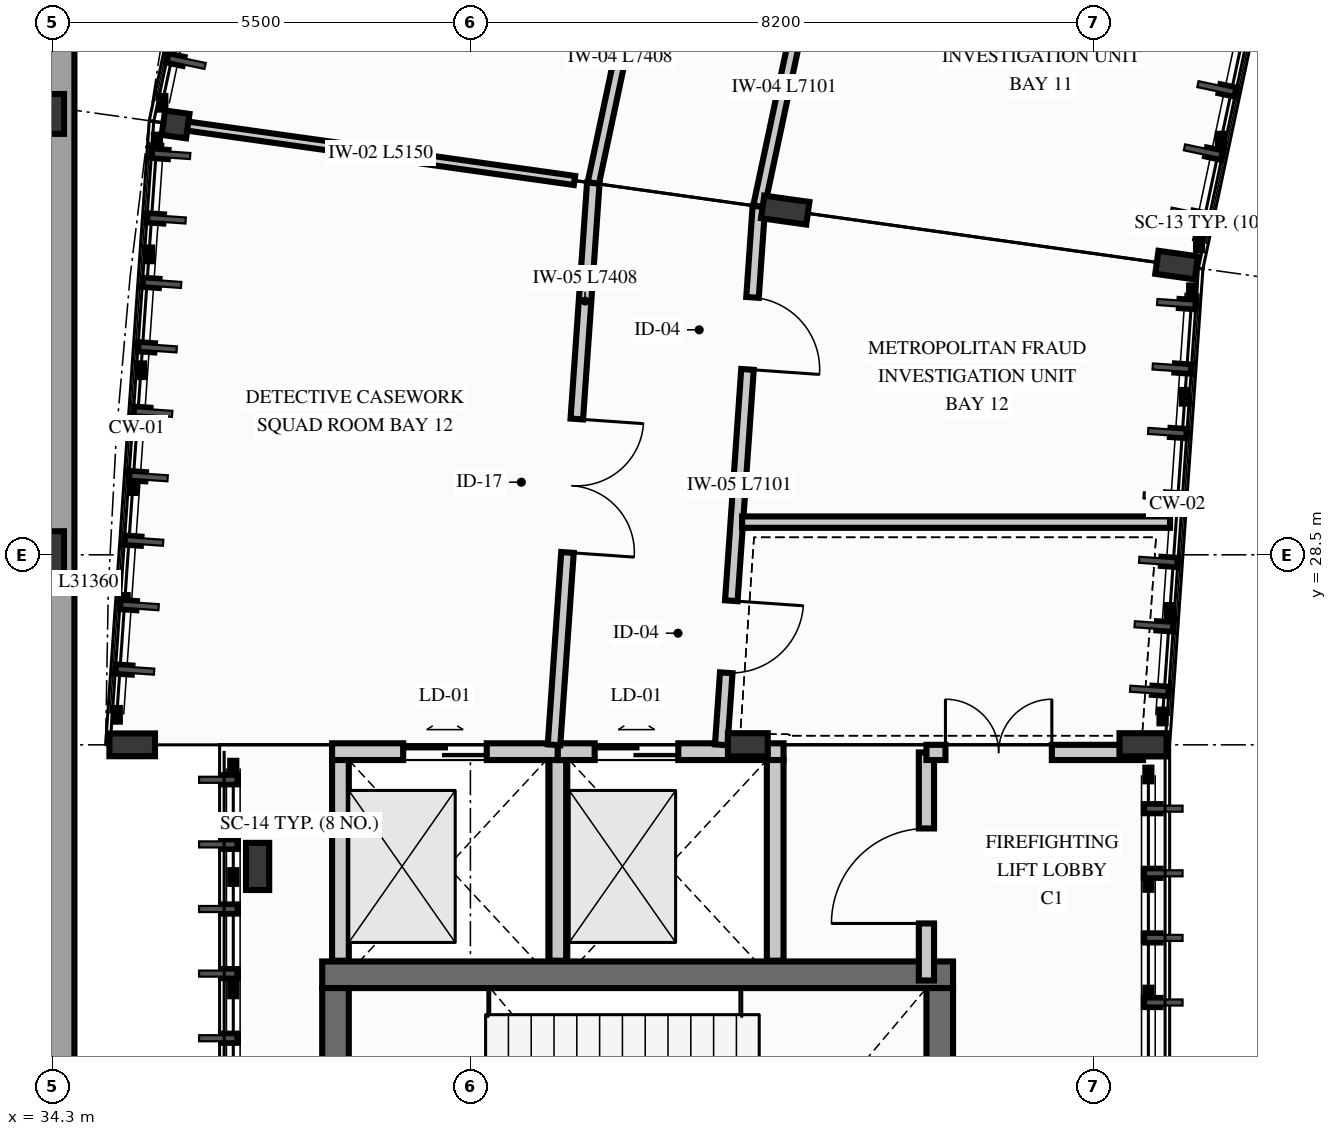
"""IFC4 building model, lengths in metres.
Left out: names, types, materials, properties, quantities, classifications, styles, units other than length and angle.
Written with IfcOpenShell. Run it as: python <this file> out.ifc"""

import sys

from ifc_helpers import new_model, si_unit, direction, frame, frame_2d, origin, origin_2d, place, context, subcontext, project, spatial, rectangle, hollow_circle, i_section, extrude, element, fill, save


model = new_model("IFC4")
c1 = context("Model", 3, precision=1e-05, world=origin(), true_north=direction((0.0, 1.0)))
c2 = subcontext(c1, "Body", "Model", "MODEL_VIEW")
j1 = project(units=[si_unit("LENGTHUNIT", "METRE"), si_unit("PLANEANGLEUNIT", "RADIAN")], contexts=[c1])
p1 = place(None, origin())
s1 = spatial("IfcSite", under=j1, at=p1, CompositionType="ELEMENT")
p2 = place(p1, origin())
s2 = spatial("IfcBuilding", under=s1, at=p2, CompositionType="ELEMENT")
p3 = place(p2, frame((0.0, 0.0, 5.1)))
s3 = spatial("IfcBuildingStorey", under=s2, at=p3, CompositionType="ELEMENT", Elevation=5.1)
p4 = place(p3, frame((37.85, 22.975, 0.0), z_axis=(0.0, 0.0, 1.0), x_axis=(1.0, 0.0, 0.0)))
e1 = element("IfcWall", 1, at=p4, inside=s3, PredefinedType="SHEAR", context=c2, shape_type="SweptSolid", body=[
    extrude(rectangle(XDim=8.3, YDim=0.35, at=frame_2d((4.15, 0.0))), origin(), (0.0, 0.0, 1.0), 3.98),
])
p5 = place(p3, frame((38.025, 16.0, 0.0), z_axis=(0.0, 0.0, 1.0), x_axis=(0.0, 1.0, 0.0)))
e2 = element("IfcWall", 2, at=p5, inside=s3, PredefinedType="SHEAR", context=c2, shape_type="SweptSolid", body=[
    extrude(rectangle(XDim=6.8, YDim=0.35, at=frame_2d((3.4, 0.0))), origin(), (0.0, 0.0, 1.0), 3.98),
])
p6 = place(p5, frame((2.6, 0.0, 0.0)))
e3 = element("IfcOpeningElement", 3, at=p6, cuts=e2, PredefinedType="OPENING", context=c2, shape_type="SweptSolid", body=[
    extrude(rectangle(XDim=1.25, YDim=2.2, at=frame_2d((0.625, 1.1))), frame((0.0, 0.185, 0.0), z_axis=(0.0, -1.0, 0.0), x_axis=(1.0, 0.0, 0.0)), (0.0, 0.0, 1.0), 0.37),
])
p7 = place(p3, frame((45.975, 16.0, 0.0), z_axis=(0.0, 0.0, 1.0), x_axis=(0.0, 1.0, 0.0)))
e4 = element("IfcWall", 4, at=p7, inside=s3, PredefinedType="SHEAR", context=c2, shape_type="SweptSolid", body=[
    extrude(rectangle(XDim=6.8, YDim=0.35, at=frame_2d((3.4, 0.0))), origin(), (0.0, 0.0, 1.0), 3.98),
])
p8 = place(p3, frame((49.091, 32.312, 0.0), z_axis=(0.0, 0.0, 1.0), x_axis=(0.13917310096, 0.990268068742, 0.0)))
e5 = element("IfcColumn", 5, at=p8, inside=s3, PredefinedType="COLUMN", context=c2, shape_type="SweptSolid", body=[
    extrude(i_section(OverallWidth=0.306, OverallDepth=0.524, WebThickness=0.021, FlangeThickness=0.04, FilletRadius=0.027, at=origin_2d()), origin(), (0.0, 0.0, 1.0), 4.2),
])
p9 = place(p3, frame((43.942, 33.035, 0.0), z_axis=(0.0, 0.0, 1.0), x_axis=(0.13917310096, 0.990268068742, 0.0)))
e6 = element("IfcColumn", 6, at=p9, inside=s3, PredefinedType="COLUMN", context=c2, shape_type="SweptSolid", body=[
    extrude(i_section(OverallWidth=0.3, OverallDepth=0.6, WebThickness=0.015, FlangeThickness=0.03, FilletRadius=0.027, at=origin_2d()), origin(), (0.0, 0.0, 1.0), 4.2),
])
p10 = place(p3, frame((35.921, 34.163, 0.0), z_axis=(0.0, 0.0, 1.0), x_axis=(0.13917310096, 0.990268068742, 0.0)))
e7 = element("IfcColumn", 7, at=p10, inside=s3, PredefinedType="COLUMN", context=c2, shape_type="SweptSolid", body=[
    extrude(hollow_circle(Radius=0.162, WallThickness=0.016, at=origin_2d()), origin(), (0.0, 0.0, 1.0), 4.2),
])
p11 = place(p3, frame((48.65, 26.0, 0.0), z_axis=(0.0, 0.0, 1.0), x_axis=(0.0, 1.0, 0.0)))
e8 = element("IfcColumn", 8, at=p11, inside=s3, PredefinedType="COLUMN", context=c2, shape_type="SweptSolid", body=[
    extrude(i_section(OverallWidth=0.305, OverallDepth=0.62, WebThickness=0.021, FlangeThickness=0.04, FilletRadius=0.027, at=origin_2d()), origin(), (0.0, 0.0, 1.0), 4.2),
])
p12 = place(p3, frame((43.45, 26.0, 0.0), z_axis=(0.0, 0.0, 1.0), x_axis=(0.0, 1.0, 0.0)))
e9 = element("IfcColumn", 9, at=p12, inside=s3, PredefinedType="COLUMN", context=c2, shape_type="SweptSolid", body=[
    extrude(i_section(OverallWidth=0.306, OverallDepth=0.524, WebThickness=0.021, FlangeThickness=0.04, FilletRadius=0.027, at=origin_2d()), origin(), (0.0, 0.0, 1.0), 4.2),
])
p13 = place(p3, frame((35.35, 26.0, 0.0), z_axis=(0.0, 0.0, 1.0), x_axis=(0.0, 1.0, 0.0)))
e10 = element("IfcColumn", 10, at=p13, inside=s3, PredefinedType="COLUMN", context=c2, shape_type="SweptSolid", body=[
    extrude(i_section(OverallWidth=0.3, OverallDepth=0.6, WebThickness=0.015, FlangeThickness=0.03, FilletRadius=0.027, at=origin_2d()), origin(), (0.0, 0.0, 1.0), 4.2),
])
for number, where, z_axis, x_axis in (
    (11, (37.0, 24.4, 0.0), (0.0, 0.0, 1.0), (1.0, 0.0, 0.0)),
    (12, (34.3, 28.5, 0.0), (0.0, 0.0, 1.0), (1.0, 0.0, 0.0)),
):
    element("IfcColumn", number, at=place(p3, frame(where, z_axis=z_axis, x_axis=x_axis)), inside=s3, PredefinedType="COLUMN", context=c2, shape_type="SweptSolid", body=[
        extrude(i_section(OverallWidth=0.305, OverallDepth=0.62, WebThickness=0.021, FlangeThickness=0.04, FilletRadius=0.027, at=origin_2d()), origin(), (0.0, 0.0, 1.0), 4.2),
    ])
p14 = place(p3, frame((34.3, 34.3, 0.0), z_axis=(0.0, 0.0, 1.0), x_axis=(1.0, 0.0, 0.0)))
e13 = element("IfcColumn", 13, at=p14, inside=s3, PredefinedType="COLUMN", context=c2, shape_type="SweptSolid", body=[
    extrude(i_section(OverallWidth=0.306, OverallDepth=0.524, WebThickness=0.021, FlangeThickness=0.04, FilletRadius=0.027, at=origin_2d()), origin(), (0.0, 0.0, 1.0), 4.2),
])
p15 = place(p3, frame((34.38, 4.93, 0.0), z_axis=(0.0, 0.0, 1.0), x_axis=(0.0, 1.0, 0.0)))
e14 = element("IfcWall", 14, at=p15, inside=s3, PredefinedType="SOLIDWALL", context=c2, shape_type="SweptSolid", body=[
    extrude(rectangle(XDim=31.36, YDim=0.42, at=frame_2d((15.68, 0.0))), origin(), (0.0, 0.0, 1.0), 3.68),
])
p16 = place(p15, frame((1.65, 0.0, 0.85)))
e15 = element("IfcOpeningElement", 15, at=p16, cuts=e14, PredefinedType="OPENING", context=c2, shape_type="SweptSolid", body=[
    extrude(rectangle(XDim=1.3, YDim=2.15, at=frame_2d((0.65, 1.075))), frame((0.0, 0.22, 0.0), z_axis=(0.0, -1.0, 0.0), x_axis=(1.0, 0.0, 0.0)), (0.0, 0.0, 1.0), 0.44),
])
p17 = place(p15, frame((9.65, 0.0, 0.74)))
e16 = element("IfcOpeningElement", 16, at=p17, cuts=e14, PredefinedType="OPENING", context=c2, shape_type="SweptSolid", body=[
    extrude(rectangle(XDim=1.6, YDim=2.4, at=frame_2d((0.8, 1.2))), frame((0.0, 0.22, 0.0), z_axis=(0.0, -1.0, 0.0), x_axis=(1.0, 0.0, 0.0)), (0.0, 0.0, 1.0), 0.44),
])
p18 = place(p15, frame((13.65, 0.0, 0.85)))
e17 = element("IfcOpeningElement", 17, at=p18, cuts=e14, PredefinedType="OPENING", context=c2, shape_type="SweptSolid", body=[
    extrude(rectangle(XDim=1.4, YDim=2.2, at=frame_2d((0.7, 1.1))), frame((0.0, 0.22, 0.0), z_axis=(0.0, -1.0, 0.0), x_axis=(1.0, 0.0, 0.0)), (0.0, 0.0, 1.0), 0.44),
])
p19 = place(p3, frame((37.98, 25.91, 0.0), z_axis=(0.0, 0.0, 1.0), x_axis=(1.0, 0.0, 0.0)))
e18 = element("IfcWall", 18, at=p19, inside=s3, PredefinedType="PARTITIONING", context=c2, shape_type="SweptSolid", body=[
    extrude(rectangle(XDim=2.97, YDim=0.22, at=frame_2d((1.485, 0.0))), origin(), (0.0, 0.0, 1.0), 3.53),
])
p20 = place(p19, frame((0.935, 0.0, 0.0)))
e19 = element("IfcOpeningElement", 19, at=p20, cuts=e18, PredefinedType="OPENING", context=c2, shape_type="SweptSolid", body=[
    extrude(rectangle(XDim=1.1, YDim=2.15, at=frame_2d((0.55, 1.075))), frame((0.0, 0.12, 0.0), z_axis=(0.0, -1.0, 0.0), x_axis=(1.0, 0.0, 0.0)), (0.0, 0.0, 1.0), 0.24),
])
for number, where, z_axis, x_axis in (
    (20, (38.09, 23.16, 0.0), (0.0, 0.0, 1.0), (0.0, 1.0, 0.0)),
    (21, (40.95, 23.16, 0.0), (0.0, 0.0, 1.0), (0.0, 1.0, 0.0)),
):
    element("IfcWall", number, at=place(p3, frame(where, z_axis=z_axis, x_axis=x_axis)), inside=s3, PredefinedType="PARTITIONING", context=c2, shape_type="SweptSolid", body=[
        extrude(rectangle(XDim=2.64, YDim=0.22, at=frame_2d((1.32, 0.0))), origin(), (0.0, 0.0, 1.0), 3.92),
    ])
p21 = place(p3, frame((40.95, 25.91, 0.0), z_axis=(0.0, 0.0, 1.0), x_axis=(1.0, 0.0, 0.0)))
e22 = element("IfcWall", 22, at=p21, inside=s3, PredefinedType="PARTITIONING", context=c2, shape_type="SweptSolid", body=[
    extrude(rectangle(XDim=2.97, YDim=0.22, at=frame_2d((1.485, 0.0))), origin(), (0.0, 0.0, 1.0), 3.53),
])
p22 = place(p21, frame((0.485, 0.0, 0.0)))
e23 = element("IfcOpeningElement", 23, at=p22, cuts=e22, PredefinedType="OPENING", context=c2, shape_type="SweptSolid", body=[
    extrude(rectangle(XDim=1.1, YDim=2.15, at=frame_2d((0.55, 1.075))), frame((0.0, 0.12, 0.0), z_axis=(0.0, -1.0, 0.0), x_axis=(1.0, 0.0, 0.0)), (0.0, 0.0, 1.0), 0.24),
])
p23 = place(p3, frame((43.81, 23.16, 0.0), z_axis=(0.0, 0.0, 1.0), x_axis=(0.0, 1.0, 0.0)))
e24 = element("IfcWall", 24, at=p23, inside=s3, PredefinedType="PARTITIONING", context=c2, shape_type="SweptSolid", body=[
    extrude(rectangle(XDim=2.64, YDim=0.22, at=frame_2d((1.32, 0.0))), origin(), (0.0, 0.0, 1.0), 3.92),
])
p24 = place(p3, frame((45.8, 22.9, 0.0), z_axis=(0.0, 0.0, 1.0), x_axis=(0.0, 1.0, 0.0)))
e25 = element("IfcWall", 25, at=p24, inside=s3, PredefinedType="PARTITIONING", context=c2, shape_type="SweptSolid", body=[
    extrude(rectangle(XDim=3.0, YDim=0.2, at=frame_2d((1.5, 0.0))), origin(), (0.0, 0.0, 1.0), 3.92),
])
p25 = place(p24, frame((0.75, 0.0, 0.0)))
e26 = element("IfcOpeningElement", 26, at=p25, cuts=e25, PredefinedType="OPENING", context=c2, shape_type="SweptSolid", body=[
    extrude(rectangle(XDim=1.25, YDim=2.2, at=frame_2d((0.625, 1.1))), frame((0.0, 0.11, 0.0), z_axis=(0.0, -1.0, 0.0), x_axis=(1.0, 0.0, 0.0)), (0.0, 0.0, 1.0), 0.22),
])
p26 = place(p3, frame((45.8, 25.9, 0.0), z_axis=(0.0, 0.0, 1.0), x_axis=(1.0, 0.0, 0.0)))
e27 = element("IfcWall", 27, at=p26, inside=s3, PredefinedType="PARTITIONING", context=c2, shape_type="SweptSolid", body=[
    extrude(rectangle(XDim=2.85, YDim=0.2, at=frame_2d((1.425, 0.0))), origin(), (0.0, 0.0, 1.0), 3.58),
])
p27 = place(p26, frame((0.25, 0.0, 0.0)))
e28 = element("IfcOpeningElement", 28, at=p27, cuts=e27, PredefinedType="OPENING", context=c2, shape_type="SweptSolid", body=[
    extrude(rectangle(XDim=1.4, YDim=2.25, at=frame_2d((0.7, 1.125))), frame((0.0, 0.11, 0.0), z_axis=(0.0, -1.0, 0.0), x_axis=(1.0, 0.0, 0.0)), (0.0, 0.0, 1.0), 0.22),
])
p28 = place(p3, frame((45.072, 40.03, 0.0), z_axis=(0.0, 0.0, 1.0), x_axis=(-0.207903987445, -0.978149238104, 0.0)))
e29 = element("IfcWall", 29, at=p28, inside=s3, PredefinedType="PARTITIONING", context=c2, shape_type="SweptSolid", body=[
    extrude(rectangle(XDim=7.101, YDim=0.15, at=frame_2d((3.551, 0.0))), origin(), (0.0, 0.0, 1.0), 3.92),
])
p29 = place(p28, frame((2.982, 0.0, 0.0)))
e30 = element("IfcOpeningElement", 30, at=p29, cuts=e29, PredefinedType="OPENING", context=c2, shape_type="SweptSolid", body=[
    extrude(rectangle(XDim=0.92, YDim=2.12, at=frame_2d((0.46, 1.06))), frame((0.0, 0.085, 0.0), z_axis=(0.0, -1.0, 0.0), x_axis=(1.0, 0.0, 0.0)), (0.0, 0.0, 1.0), 0.17),
])
p30 = place(p3, frame((42.957, 40.636, 0.0), z_axis=(0.0, 0.0, 1.0), x_axis=(-0.207921820376, -0.978145447575, 0.0)))
e31 = element("IfcWall", 31, at=p30, inside=s3, PredefinedType="PARTITIONING", context=c2, shape_type="SweptSolid", body=[
    extrude(rectangle(XDim=7.408, YDim=0.15, at=frame_2d((3.704, 0.0))), origin(), (0.0, 0.0, 1.0), 3.92),
])
p31 = place(p30, frame((3.111, 0.0, 0.0)))
e32 = element("IfcOpeningElement", 32, at=p31, cuts=e31, PredefinedType="OPENING", context=c2, shape_type="SweptSolid", body=[
    extrude(rectangle(XDim=0.9, YDim=2.1, at=frame_2d((0.45, 1.05))), frame((0.0, 0.085, 0.0), z_axis=(0.0, -1.0, 0.0), x_axis=(1.0, 0.0, 0.0)), (0.0, 0.0, 1.0), 0.17),
])
p32 = place(p3, frame((41.169, 33.425, 0.0), z_axis=(0.0, 0.0, 1.0), x_axis=(-0.990266484291, 0.13918437445, 0.0)))
e33 = element("IfcWall", 33, at=p32, inside=s3, PredefinedType="PARTITIONING", context=c2, shape_type="SweptSolid", body=[
    extrude(rectangle(XDim=5.15, YDim=0.12, at=frame_2d((2.575, 0.0))), origin(), (0.0, 0.0, 1.0), 3.53),
])
p33 = place(p3, frame((43.595, 33.084, 0.0), z_axis=(0.0, 0.0, 1.0), x_axis=(-0.069756597752, -0.997564041588, 0.0)))
e34 = element("IfcWall", 34, at=p33, inside=s3, PredefinedType="PARTITIONING", context=c2, shape_type="SweptSolid", body=[
    extrude(rectangle(XDim=7.101, YDim=0.165, at=frame_2d((3.551, 0.0))), origin(), (0.0, 0.0, 1.0), 3.92),
])
p34 = place(p33, frame((5.201, 0.0, 0.0)))
e35 = element("IfcOpeningElement", 35, at=p34, cuts=e34, PredefinedType="OPENING", context=c2, shape_type="SweptSolid", body=[
    extrude(rectangle(XDim=0.95, YDim=2.15, at=frame_2d((0.475, 1.075))), frame((0.0, 0.093, 0.0), z_axis=(0.0, -1.0, 0.0), x_axis=(1.0, 0.0, 0.0)), (0.0, 0.0, 1.0), 0.185),
])
p35 = place(p33, frame((1.2, 0.0, 0.0)))
e36 = element("IfcOpeningElement", 36, at=p35, cuts=e34, PredefinedType="OPENING", context=c2, shape_type="SweptSolid", body=[
    extrude(rectangle(XDim=0.95, YDim=2.15, at=frame_2d((0.475, 1.075))), frame((0.0, 0.093, 0.0), z_axis=(0.0, -1.0, 0.0), x_axis=(1.0, 0.0, 0.0)), (0.0, 0.0, 1.0), 0.185),
])
p36 = place(p3, frame((41.417, 33.39, 0.0), z_axis=(0.0, 0.0, 1.0), x_axis=(-0.069766817412, -0.997563326906, 0.0)))
e37 = element("IfcWall", 37, at=p36, inside=s3, PredefinedType="PARTITIONING", context=c2, shape_type="SweptSolid", body=[
    extrude(rectangle(XDim=7.408, YDim=0.165, at=frame_2d((3.704, 0.0))), origin(), (0.0, 0.0, 1.0), 3.92),
])
p37 = place(p36, frame((3.111, 0.0, 0.0)))
e38 = element("IfcOpeningElement", 38, at=p37, cuts=e37, PredefinedType="OPENING", context=c2, shape_type="SweptSolid", body=[
    extrude(rectangle(XDim=1.76, YDim=2.36, at=frame_2d((0.88, 1.18))), frame((0.0, 0.093, 0.0), z_axis=(0.0, -1.0, 0.0), x_axis=(1.0, 0.0, 0.0)), (0.0, 0.0, 1.0), 0.185),
])
p38 = place(p3, frame((43.375, 28.93, 0.0), z_axis=(0.0, 0.0, 1.0), x_axis=(1.0, 0.0, 0.0)))
e39 = element("IfcWall", 39, at=p38, inside=s3, PredefinedType="PARTITIONING", context=c2, shape_type="SweptSolid", body=[
    extrude(rectangle(XDim=5.63, YDim=0.15, at=frame_2d((2.815, 0.0))), origin(), (0.0, 0.0, 1.0), 3.678),
])
p39 = place(p20, origin())
e40 = element("IfcDoor", 40, at=p39, inside=s3, OperationType="DOUBLE_DOOR_SLIDING", PredefinedType="DOOR", context=c2, shape_type="SweptSolid", body=[
    extrude(rectangle(XDim=1.1, YDim=2.15, at=frame_2d((0.55, 1.075))), frame((0.0, 0.025, 0.0), z_axis=(0.0, -1.0, 0.0), x_axis=(1.0, 0.0, 0.0)), (0.0, 0.0, 1.0), 0.05),
])
fill(e19, e40)
p40 = place(p22, origin())
e41 = element("IfcDoor", 41, at=p40, inside=s3, OperationType="DOUBLE_DOOR_SLIDING", PredefinedType="DOOR", context=c2, shape_type="SweptSolid", body=[
    extrude(rectangle(XDim=1.1, YDim=2.15, at=frame_2d((0.55, 1.075))), frame((0.0, 0.025, 0.0), z_axis=(0.0, -1.0, 0.0), x_axis=(1.0, 0.0, 0.0)), (0.0, 0.0, 1.0), 0.05),
])
fill(e23, e41)
p41 = place(p27, origin())
e42 = element("IfcDoor", 42, at=p41, inside=s3, OperationType="DOUBLE_DOOR_SINGLE_SWING", PredefinedType="DOOR", context=c2, shape_type="SweptSolid", body=[
    extrude(rectangle(XDim=1.4, YDim=2.25, at=frame_2d((0.7, 1.125))), frame((0.0, 0.025, 0.0), z_axis=(0.0, -1.0, 0.0), x_axis=(1.0, 0.0, 0.0)), (0.0, 0.0, 1.0), 0.05),
])
fill(e28, e42)
p42 = place(p25, origin())
e43 = element("IfcDoor", 43, at=p42, inside=s3, OperationType="SINGLE_SWING_LEFT", PredefinedType="DOOR", context=c2, shape_type="SweptSolid", body=[
    extrude(rectangle(XDim=1.25, YDim=2.2, at=frame_2d((0.625, 1.1))), frame((0.0, 0.025, 0.0), z_axis=(0.0, -1.0, 0.0), x_axis=(1.0, 0.0, 0.0)), (0.0, 0.0, 1.0), 0.05),
])
fill(e26, e43)
p43 = place(p34, origin())
e44 = element("IfcDoor", 44, at=p43, inside=s3, OperationType="SINGLE_SWING_LEFT", PredefinedType="DOOR", context=c2, shape_type="SweptSolid", body=[
    extrude(rectangle(XDim=0.95, YDim=2.15, at=frame_2d((0.475, 1.075))), frame((0.0, 0.025, 0.0), z_axis=(0.0, -1.0, 0.0), x_axis=(1.0, 0.0, 0.0)), (0.0, 0.0, 1.0), 0.05),
])
fill(e35, e44)
p44 = place(p35, origin())
e45 = element("IfcDoor", 45, at=p44, inside=s3, OperationType="SINGLE_SWING_RIGHT", PredefinedType="DOOR", context=c2, shape_type="SweptSolid", body=[
    extrude(rectangle(XDim=0.95, YDim=2.15, at=frame_2d((0.475, 1.075))), frame((0.0, 0.025, 0.0), z_axis=(0.0, -1.0, 0.0), x_axis=(1.0, 0.0, 0.0)), (0.0, 0.0, 1.0), 0.05),
])
fill(e36, e45)
p45 = place(p37, origin())
e46 = element("IfcDoor", 46, at=p45, inside=s3, OperationType="DOUBLE_DOOR_SINGLE_SWING", PredefinedType="DOOR", context=c2, shape_type="SweptSolid", body=[
    extrude(rectangle(XDim=1.76, YDim=2.36, at=frame_2d((0.88, 1.18))), frame((0.0, 0.025, 0.0), z_axis=(0.0, -1.0, 0.0), x_axis=(1.0, 0.0, 0.0)), (0.0, 0.0, 1.0), 0.05),
])
fill(e38, e46)
save(model, sys.argv[1])
